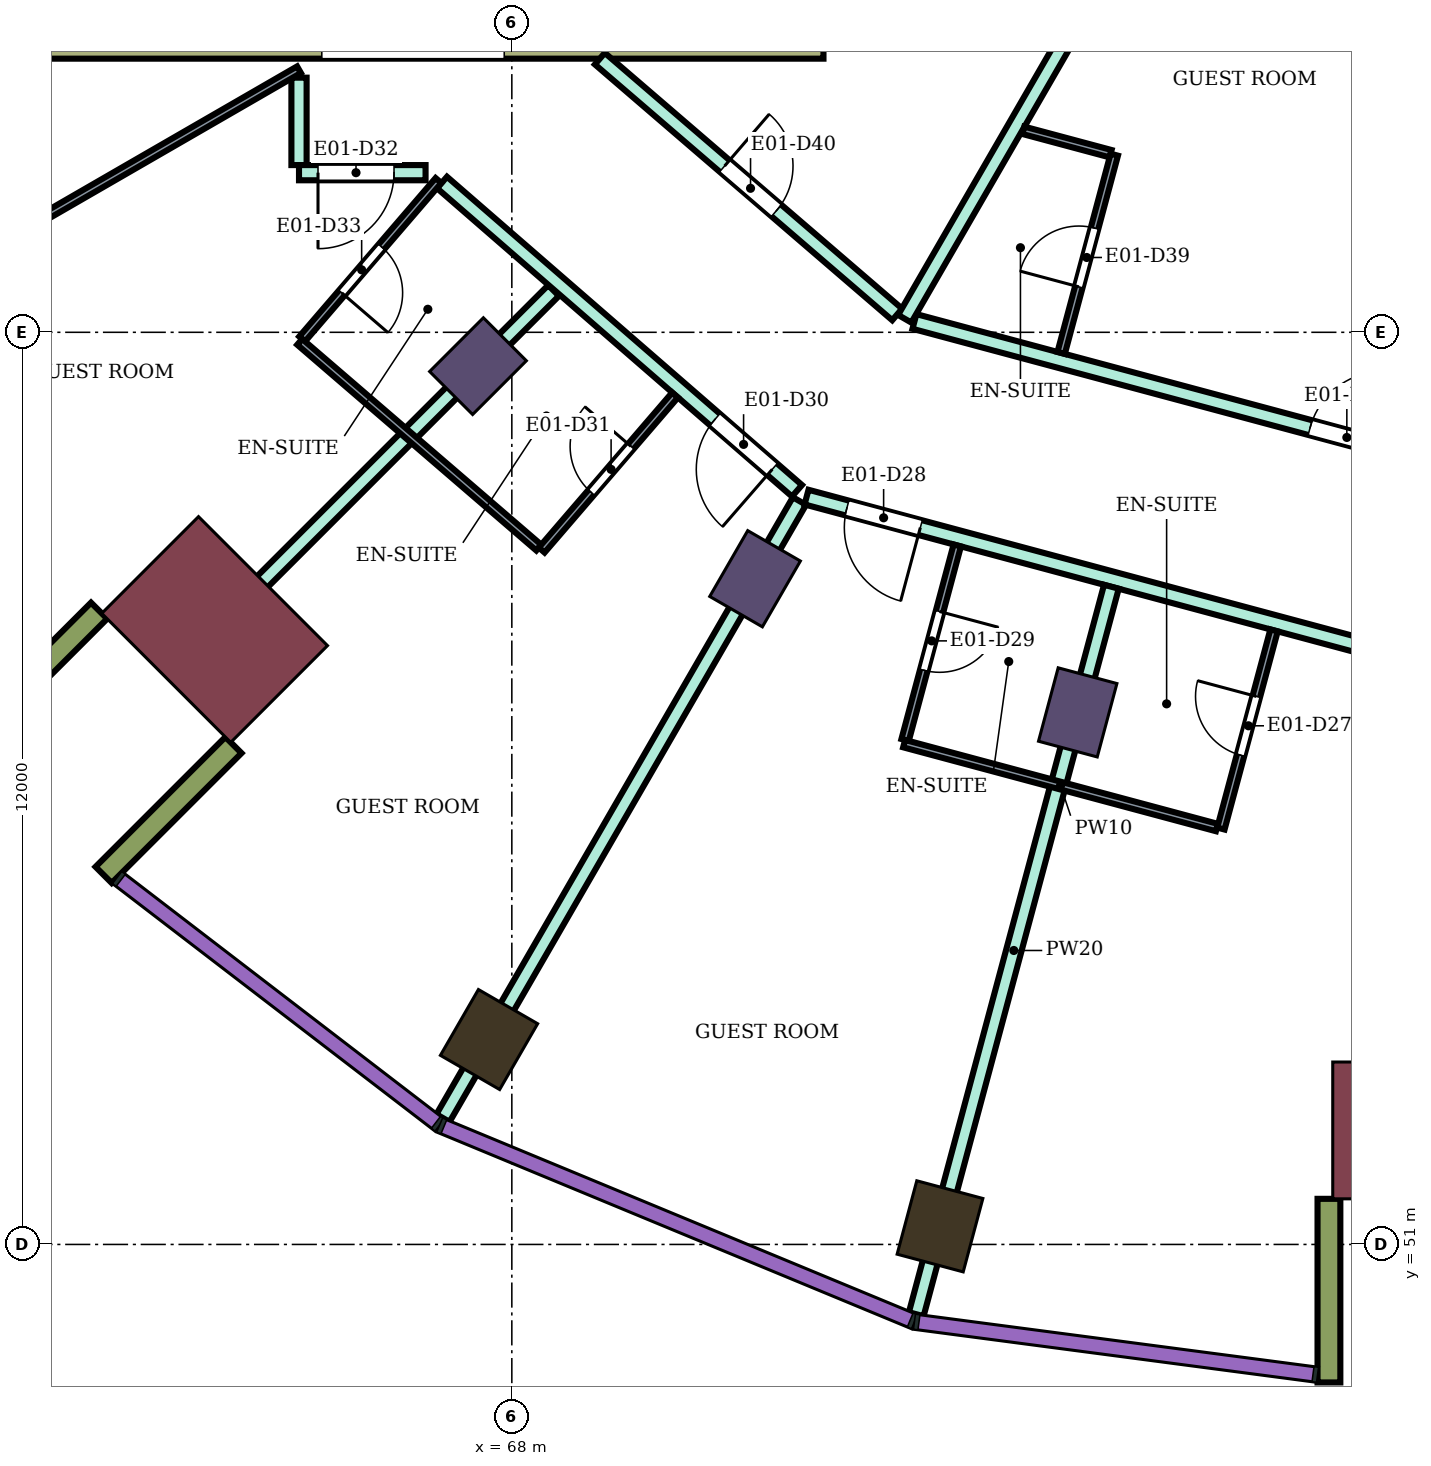
"""IFC4 building model, lengths in metres.
Left out: names, types, materials, properties, quantities, classifications, styles, units other than length and angle.
Written with IfcOpenShell. Run it as: python <this file> out.ifc"""

import sys

from ifc_helpers import new_model, si_unit, direction, frame, frame_2d, origin, origin_2d, place, context, subcontext, project, spatial, rectangle, extrude, element, fill, save


model = new_model("IFC4")
c1 = context("Model", 3, precision=1e-05, world=origin(), true_north=direction((0.0, 1.0)))
c2 = subcontext(c1, "Body", "Model", "MODEL_VIEW")
j1 = project(units=[si_unit("LENGTHUNIT", "METRE"), si_unit("PLANEANGLEUNIT", "RADIAN")], contexts=[c1])
p1 = place(None, origin())
s1 = spatial("IfcSite", under=j1, at=p1, CompositionType="ELEMENT")
p2 = place(p1, origin())
s2 = spatial("IfcBuilding", under=s1, at=p2, CompositionType="ELEMENT")
p3 = place(p2, frame((0.0, 0.0, 114.6)))
s3 = spatial("IfcBuildingStorey", under=s2, at=p3, CompositionType="ELEMENT", Elevation=114.6)
for number, where, z_axis, x_axis in (
    (1, (67.7, 53.696, 0.0), (0.0, 0.0, 1.0), (-0.5, -0.866, 0.0)),
    (2, (73.633, 51.238, 0.0), (0.0, 0.0, 1.0), (-0.259, -0.966, 0.0)),
):
    element("IfcColumn", number, at=place(p3, frame(where, z_axis=z_axis, x_axis=x_axis)), inside=s3, PredefinedType="COLUMN", context=c2, shape_type="SweptSolid", body=[
        extrude(rectangle(XDim=1.0, YDim=0.9, at=origin_2d()), origin(), (0.0, 0.0, 1.0), 3.9),
    ])
for number, where, z_axis, x_axis in (
    (3, (67.555, 62.555, 0.0), (0.0, 0.0, 1.0), (-0.707, -0.707, 0.0)),
    (4, (71.2, 59.758, 0.0), (0.0, 0.0, 1.0), (-0.5, -0.866, 0.0)),
    (5, (75.445, 58.0, 0.0), (0.0, 0.0, 1.0), (-0.259, -0.966, 0.0)),
):
    element("IfcColumn", number, at=place(p3, frame(where, z_axis=z_axis, x_axis=x_axis)), inside=s3, PredefinedType="COLUMN", context=c2, shape_type="SweptSolid", body=[
        extrude(rectangle(XDim=1.0, YDim=0.8, at=origin_2d()), origin(), (0.0, 0.0, 1.0), 3.9),
    ])
for number, where, z_axis, x_axis in (
    (6, (64.09, 59.09, 0.0), (0.0, 0.0, 1.0), (-0.707, -0.707, 0.0)),
    (7, (80.0, 52.5, 0.0), (0.0, 0.0, 1.0), (0.0, -1.0, 0.0)),
):
    element("IfcColumn", number, at=place(p3, frame(where, z_axis=z_axis, x_axis=x_axis)), inside=s3, PredefinedType="COLUMN", context=c2, shape_type="SweptSolid", body=[
        extrude(rectangle(XDim=1.8, YDim=2.4, at=origin_2d()), origin(), (0.0, 0.0, 1.0), 3.9),
    ])
p4 = place(p3, frame((72.1, 66.95, 0.0), z_axis=(0.0, 0.0, 1.0), x_axis=(-1.0, 0.0, 0.0)))
e8 = element("IfcWall", 8, at=p4, inside=s3, PredefinedType="SHEAR", context=c2, shape_type="SweptSolid", body=[
    extrude(rectangle(XDim=14.8, YDim=0.7, at=frame_2d((7.4, 0.0))), origin(), (0.0, 0.0, 1.0), 3.58),
])
p5 = place(p4, frame((4.2, 0.0, 0.0)))
e9 = element("IfcOpeningElement", 9, at=p5, cuts=e8, PredefinedType="OPENING", context=c2, shape_type="SweptSolid", body=[
    extrude(rectangle(XDim=2.4, YDim=2.4, at=frame_2d((1.2, 1.2))), frame((0.0, 0.36, 0.0), z_axis=(0.0, -1.0, 0.0), x_axis=(1.0, 0.0, 0.0)), (0.0, 0.0, 1.0), 0.72),
])
for number, where, z_axis, x_axis in (
    (10, (62.57, 59.338, 0.0), (0.0, 0.0, 1.0), (-0.707, -0.707, 0.0)),
    (11, (64.338, 57.57, 0.0), (0.0, 0.0, 1.0), (-0.707, -0.707, 0.0)),
    (12, (78.75, 51.6, 0.0), (0.0, 0.0, 1.0), (0.0, -1.0, 0.0)),
):
    element("IfcWall", number, at=place(p3, frame(where, z_axis=z_axis, x_axis=x_axis)), inside=s3, PredefinedType="NOTDEFINED", context=c2, shape_type="SweptSolid", body=[
        extrude(rectangle(XDim=2.416, YDim=0.3, at=frame_2d((1.208, 0.0))), origin(), (0.0, 0.0, 1.0), 3.9),
    ])
p6 = place(p3, frame((63.596, 58.596, 0.0), z_axis=(0.0, 0.0, 1.0), x_axis=(0.707106781187, 0.707106781187, 0.0)))
e13 = element("IfcWall", 13, at=p6, inside=s3, PredefinedType="PARTITIONING", context=c2, shape_type="SweptSolid", body=[
    extrude(rectangle(XDim=7.005, YDim=0.2, at=frame_2d((3.503, 0.0))), origin(), (0.0, 0.0, 1.0), 3.45),
])
p7 = place(p3, frame((65.2, 65.2, 0.0), z_axis=(0.0, 0.0, 1.0), x_axis=(0.0, 1.0, 0.0)))
e14 = element("IfcWall", 14, at=p7, inside=s3, PredefinedType="PARTITIONING", context=c2, shape_type="SweptSolid", body=[
    extrude(rectangle(XDim=1.15, YDim=0.2, at=frame_2d((0.575, 0.0))), origin(), (0.0, 0.0, 1.0), 3.45),
])
p8 = place(p3, frame((65.2, 65.1, 0.0), z_axis=(0.0, 0.0, 1.0), x_axis=(1.0, 0.0, 0.0)))
e15 = element("IfcWall", 15, at=p8, inside=s3, PredefinedType="PARTITIONING", context=c2, shape_type="SweptSolid", body=[
    extrude(rectangle(XDim=1.665, YDim=0.2, at=frame_2d((0.833, 0.0))), origin(), (0.0, 0.0, 1.0), 3.45),
])
p9 = place(p8, frame((0.25, 0.0, 0.0)))
e16 = element("IfcOpeningElement", 16, at=p9, cuts=e15, PredefinedType="OPENING", context=c2, shape_type="SweptSolid", body=[
    extrude(rectangle(XDim=1.0, YDim=2.1, at=frame_2d((0.5, 1.05))), frame((0.0, 0.11, 0.0), z_axis=(0.0, -1.0, 0.0), x_axis=(1.0, 0.0, 0.0)), (0.0, 0.0, 1.0), 0.22),
])
p10 = place(p3, frame((67.081, 64.971, 0.0), z_axis=(0.0, 0.0, 1.0), x_axis=(0.755031061605, -0.65568902386, 0.0)))
e17 = element("IfcWall", 17, at=p10, inside=s3, PredefinedType="PARTITIONING", context=c2, shape_type="SweptSolid", body=[
    extrude(rectangle(XDim=6.186, YDim=0.2, at=frame_2d((3.093, 0.0))), origin(), (0.0, 0.0, 1.0), 3.45),
])
p11 = place(p10, frame((4.755, 0.0, 0.0)))
e18 = element("IfcOpeningElement", 18, at=p11, cuts=e17, PredefinedType="OPENING", context=c2, shape_type="SweptSolid", body=[
    extrude(rectangle(XDim=1.0, YDim=2.1, at=frame_2d((0.5, 1.05))), frame((0.0, 0.11, 0.0), z_axis=(0.0, -1.0, 0.0), x_axis=(1.0, 0.0, 0.0)), (0.0, 0.0, 1.0), 0.22),
])
p12 = place(p3, frame((67.094, 52.663, 0.0), z_axis=(0.0, 0.0, 1.0), x_axis=(0.500228134253, 0.865893650342, 0.0)))
e19 = element("IfcWall", 19, at=p12, inside=s3, PredefinedType="PARTITIONING", context=c2, shape_type="SweptSolid", body=[
    extrude(rectangle(XDim=9.375, YDim=0.2, at=frame_2d((4.687, 0.0))), origin(), (0.0, 0.0, 1.0), 3.45),
])
p13 = place(p3, frame((69.158, 66.6, 0.0), z_axis=(0.0, 0.0, 1.0), x_axis=(0.758063092745, -0.652181222835, 0.0)))
e20 = element("IfcWall", 20, at=p13, inside=s3, PredefinedType="PARTITIONING", context=c2, shape_type="SweptSolid", body=[
    extrude(rectangle(XDim=5.16, YDim=0.2, at=frame_2d((2.58, 0.0))), origin(), (0.0, 0.0, 1.0), 3.45),
])
p14 = place(p13, frame((2.165, 0.0, 0.0)))
e21 = element("IfcOpeningElement", 21, at=p14, cuts=e20, PredefinedType="OPENING", context=c2, shape_type="SweptSolid", body=[
    extrude(rectangle(XDim=0.9, YDim=2.1, at=frame_2d((0.45, 1.05))), frame((0.0, 0.11, 0.0), z_axis=(0.0, -1.0, 0.0), x_axis=(1.0, 0.0, 0.0)), (0.0, 0.0, 1.0), 0.22),
])
p15 = place(p3, frame((71.877, 60.832, 0.0), z_axis=(0.0, 0.0, 1.0), x_axis=(0.965857276008, -0.259074742848, 0.0)))
e22 = element("IfcWall", 22, at=p15, inside=s3, PredefinedType="PARTITIONING", context=c2, shape_type="SweptSolid", body=[
    extrude(rectangle(XDim=8.36, YDim=0.2, at=frame_2d((4.18, 0.0))), origin(), (0.0, 0.0, 1.0), 3.45),
])
p16 = place(p15, frame((0.55, 0.0, 0.0)))
e23 = element("IfcOpeningElement", 23, at=p16, cuts=e22, PredefinedType="OPENING", context=c2, shape_type="SweptSolid", body=[
    extrude(rectangle(XDim=1.0, YDim=2.1, at=frame_2d((0.5, 1.05))), frame((0.0, 0.11, 0.0), z_axis=(0.0, -1.0, 0.0), x_axis=(1.0, 0.0, 0.0)), (0.0, 0.0, 1.0), 0.22),
])
p17 = place(p3, frame((73.297, 63.143, 0.0), z_axis=(0.0, 0.0, 1.0), x_axis=(0.965859030528, -0.25906820173, 0.0)))
e24 = element("IfcWall", 24, at=p17, inside=s3, PredefinedType="PARTITIONING", context=c2, shape_type="SweptSolid", body=[
    extrude(rectangle(XDim=6.81, YDim=0.2, at=frame_2d((3.405, 0.0))), origin(), (0.0, 0.0, 1.0), 3.45),
])
p18 = place(p17, frame((5.39, 0.0, 0.0)))
e25 = element("IfcOpeningElement", 25, at=p18, cuts=e24, PredefinedType="OPENING", context=c2, shape_type="SweptSolid", body=[
    extrude(rectangle(XDim=1.0, YDim=2.1, at=frame_2d((0.5, 1.05))), frame((0.0, 0.11, 0.0), z_axis=(0.0, -1.0, 0.0), x_axis=(1.0, 0.0, 0.0)), (0.0, 0.0, 1.0), 0.22),
])
p19 = place(p3, frame((73.169, 63.178, 0.0), z_axis=(0.0, 0.0, 1.0), x_axis=(0.500239348149, 0.865887171959, 0.0)))
e26 = element("IfcWall", 26, at=p19, inside=s3, PredefinedType="PARTITIONING", context=c2, shape_type="SweptSolid", body=[
    extrude(rectangle(XDim=5.955, YDim=0.2, at=frame_2d((2.978, 0.0))), origin(), (0.0, 0.0, 1.0), 3.45),
])
p20 = place(p3, frame((73.321, 50.082, 0.0), z_axis=(0.0, 0.0, 1.0), x_axis=(0.259057928998, 0.96586178588, 0.0)))
e27 = element("IfcWall", 27, at=p20, inside=s3, PredefinedType="PARTITIONING", context=c2, shape_type="SweptSolid", body=[
    extrude(rectangle(XDim=9.909, YDim=0.2, at=frame_2d((4.954, 0.0))), origin(), (0.0, 0.0, 1.0), 3.45),
])
p21 = place(p3, frame((57.659, 62.101, 0.0), z_axis=(0.0, 0.0, 1.0), x_axis=(0.86602264145, 0.500004784474, 0.0)))
e28 = element("IfcWall", 28, at=p21, inside=s3, PredefinedType="PARTITIONING", context=c2, shape_type="SweptSolid", body=[
    extrude(rectangle(XDim=8.708, YDim=0.1, at=frame_2d((4.354, 0.0))), origin(), (0.0, 0.0, 1.0), 3.45),
])
p22 = place(p21, frame((3.929, 0.0, 0.0)))
e29 = element("IfcOpeningElement", 29, at=p22, cuts=e28, PredefinedType="OPENING", context=c2, shape_type="SweptSolid", body=[
    extrude(rectangle(XDim=0.9, YDim=2.1, at=frame_2d((0.45, 1.05))), frame((0.0, 0.06, 0.0), z_axis=(0.0, -1.0, 0.0), x_axis=(1.0, 0.0, 0.0)), (0.0, 0.0, 1.0), 0.12),
])
p23 = place(p3, frame((65.242, 62.912, 0.0), z_axis=(0.0, 0.0, 1.0), x_axis=(0.652069888227, 0.758158862553, 0.0)))
e30 = element("IfcWall", 30, at=p23, inside=s3, PredefinedType="PARTITIONING", context=c2, shape_type="SweptSolid", body=[
    extrude(rectangle(XDim=2.75, YDim=0.1, at=frame_2d((1.375, 0.0))), origin(), (0.0, 0.0, 1.0), 3.45),
])
p24 = place(p23, frame((0.8, 0.0, 0.0)))
e31 = element("IfcOpeningElement", 31, at=p24, cuts=e30, PredefinedType="OPENING", context=c2, shape_type="SweptSolid", body=[
    extrude(rectangle(XDim=0.8, YDim=2.1, at=frame_2d((0.4, 1.05))), frame((0.0, 0.06, 0.0), z_axis=(0.0, -1.0, 0.0), x_axis=(1.0, 0.0, 0.0)), (0.0, 0.0, 1.0), 0.12),
])
p25 = place(p3, frame((65.209, 62.875, 0.0), z_axis=(0.0, 0.0, 1.0), x_axis=(0.757930378138, -0.652335451969, 0.0)))
e32 = element("IfcWall", 32, at=p25, inside=s3, PredefinedType="PARTITIONING", context=c2, shape_type="SweptSolid", body=[
    extrude(rectangle(XDim=4.15, YDim=0.1, at=frame_2d((2.075, 0.0))), origin(), (0.0, 0.0, 1.0), 3.45),
])
p26 = place(p3, frame((68.393, 60.135, 0.0), z_axis=(0.0, 0.0, 1.0), x_axis=(0.652061182569, 0.758166349944, 0.0)))
e33 = element("IfcWall", 33, at=p26, inside=s3, PredefinedType="PARTITIONING", context=c2, shape_type="SweptSolid", body=[
    extrude(rectangle(XDim=2.69, YDim=0.1, at=frame_2d((1.345, 0.0))), origin(), (0.0, 0.0, 1.0), 3.45),
])
p27 = place(p26, frame((1.0, 0.0, 0.0)))
e34 = element("IfcOpeningElement", 34, at=p27, cuts=e33, PredefinedType="OPENING", context=c2, shape_type="SweptSolid", body=[
    extrude(rectangle(XDim=0.8, YDim=2.1, at=frame_2d((0.4, 1.05))), frame((0.0, 0.06, 0.0), z_axis=(0.0, -1.0, 0.0), x_axis=(1.0, 0.0, 0.0)), (0.0, 0.0, 1.0), 0.12),
])
p28 = place(p3, frame((73.174, 57.636, 0.0), z_axis=(0.0, 0.0, 1.0), x_axis=(0.258952498977, 0.96589005755, 0.0)))
e35 = element("IfcWall", 35, at=p28, inside=s3, PredefinedType="PARTITIONING", context=c2, shape_type="SweptSolid", body=[
    extrude(rectangle(XDim=2.65, YDim=0.1, at=frame_2d((1.325, 0.0))), origin(), (0.0, 0.0, 1.0), 3.45),
])
p29 = place(p28, frame((0.95, 0.0, 0.0)))
e36 = element("IfcOpeningElement", 36, at=p29, cuts=e35, PredefinedType="OPENING", context=c2, shape_type="SweptSolid", body=[
    extrude(rectangle(XDim=0.8, YDim=2.1, at=frame_2d((0.4, 1.05))), frame((0.0, 0.06, 0.0), z_axis=(0.0, -1.0, 0.0), x_axis=(1.0, 0.0, 0.0)), (0.0, 0.0, 1.0), 0.12),
])
p30 = place(p3, frame((73.161, 57.588, 0.0), z_axis=(0.0, 0.0, 1.0), x_axis=(0.965858226827, -0.259071198071, 0.0)))
e37 = element("IfcWall", 37, at=p30, inside=s3, PredefinedType="PARTITIONING", context=c2, shape_type="SweptSolid", body=[
    extrude(rectangle(XDim=4.26, YDim=0.1, at=frame_2d((2.13, 0.0))), origin(), (0.0, 0.0, 1.0), 3.45),
])
p31 = place(p3, frame((74.729, 65.657, 0.0), z_axis=(0.0, 0.0, 1.0), x_axis=(0.965948051503, -0.258736085224, 0.0)))
e38 = element("IfcWall", 38, at=p31, inside=s3, PredefinedType="PARTITIONING", context=c2, shape_type="SweptSolid", body=[
    extrude(rectangle(XDim=1.189, YDim=0.1, at=frame_2d((0.594, 0.0))), origin(), (0.0, 0.0, 1.0), 3.45),
])
p32 = place(p3, frame((75.227, 62.729, 0.0), z_axis=(0.0, 0.0, 1.0), x_axis=(0.258945475746, 0.965891940432, 0.0)))
e39 = element("IfcWall", 39, at=p32, inside=s3, PredefinedType="PARTITIONING", context=c2, shape_type="SweptSolid", body=[
    extrude(rectangle(XDim=2.7, YDim=0.1, at=frame_2d((1.35, 0.0))), origin(), (0.0, 0.0, 1.0), 3.45),
])
p33 = place(p32, frame((0.9, 0.0, 0.0)))
e40 = element("IfcOpeningElement", 40, at=p33, cuts=e39, PredefinedType="OPENING", context=c2, shape_type="SweptSolid", body=[
    extrude(rectangle(XDim=0.8, YDim=2.1, at=frame_2d((0.4, 1.05))), frame((0.0, 0.06, 0.0), z_axis=(0.0, -1.0, 0.0), x_axis=(1.0, 0.0, 0.0)), (0.0, 0.0, 1.0), 0.12),
])
p34 = place(p3, frame((77.329, 56.471, 0.0), z_axis=(0.0, 0.0, 1.0), x_axis=(0.259013334072, 0.965873745773, 0.0)))
e41 = element("IfcWall", 41, at=p34, inside=s3, PredefinedType="PARTITIONING", context=c2, shape_type="SweptSolid", body=[
    extrude(rectangle(XDim=2.699, YDim=0.1, at=frame_2d((1.35, 0.0))), origin(), (0.0, 0.0, 1.0), 3.45),
])
p35 = place(p34, frame((1.0, 0.0, 0.0)))
e42 = element("IfcOpeningElement", 42, at=p35, cuts=e41, PredefinedType="OPENING", context=c2, shape_type="SweptSolid", body=[
    extrude(rectangle(XDim=0.8, YDim=2.1, at=frame_2d((0.4, 1.05))), frame((0.0, 0.06, 0.0), z_axis=(0.0, -1.0, 0.0), x_axis=(1.0, 0.0, 0.0)), (0.0, 0.0, 1.0), 0.12),
])
p36 = place(p35, origin())
e43 = element("IfcDoor", 43, at=p36, inside=s3, OperationType="SINGLE_SWING_RIGHT", PredefinedType="DOOR", context=c2, shape_type="SweptSolid", body=[
    extrude(rectangle(XDim=0.8, YDim=2.1, at=frame_2d((0.4, 1.05))), frame((0.0, 0.025, 0.0), z_axis=(0.0, -1.0, 0.0), x_axis=(1.0, 0.0, 0.0)), (0.0, 0.0, 1.0), 0.05),
])
fill(e42, e43)
p37 = place(p16, frame((1.0, 0.0, 0.0), z_axis=(0.0, 0.0, 1.0), x_axis=(-1.0, 0.0, 0.0)))
e44 = element("IfcDoor", 44, at=p37, inside=s3, OperationType="SINGLE_SWING_LEFT", PredefinedType="DOOR", context=c2, shape_type="SweptSolid", body=[
    extrude(rectangle(XDim=1.0, YDim=2.1, at=frame_2d((0.5, 1.05))), frame((0.0, 0.025, 0.0), z_axis=(0.0, -1.0, 0.0), x_axis=(1.0, 0.0, 0.0)), (0.0, 0.0, 1.0), 0.05),
])
fill(e23, e44)
p38 = place(p29, frame((0.8, 0.0, 0.0), z_axis=(0.0, 0.0, 1.0), x_axis=(-1.0, 0.0, 0.0)))
e45 = element("IfcDoor", 45, at=p38, inside=s3, OperationType="SINGLE_SWING_LEFT", PredefinedType="DOOR", context=c2, shape_type="SweptSolid", body=[
    extrude(rectangle(XDim=0.8, YDim=2.1, at=frame_2d((0.4, 1.05))), frame((0.0, 0.025, 0.0), z_axis=(0.0, -1.0, 0.0), x_axis=(1.0, 0.0, 0.0)), (0.0, 0.0, 1.0), 0.05),
])
fill(e36, e45)
p39 = place(p11, frame((1.0, 0.0, 0.0), z_axis=(0.0, 0.0, 1.0), x_axis=(-1.0, 0.0, 0.0)))
e46 = element("IfcDoor", 46, at=p39, inside=s3, OperationType="SINGLE_SWING_LEFT", PredefinedType="DOOR", context=c2, shape_type="SweptSolid", body=[
    extrude(rectangle(XDim=1.0, YDim=2.1, at=frame_2d((0.5, 1.05))), frame((0.0, 0.025, 0.0), z_axis=(0.0, -1.0, 0.0), x_axis=(1.0, 0.0, 0.0)), (0.0, 0.0, 1.0), 0.05),
])
fill(e18, e46)
p40 = place(p27, origin())
e47 = element("IfcDoor", 47, at=p40, inside=s3, OperationType="SINGLE_SWING_RIGHT", PredefinedType="DOOR", context=c2, shape_type="SweptSolid", body=[
    extrude(rectangle(XDim=0.8, YDim=2.1, at=frame_2d((0.4, 1.05))), frame((0.0, 0.025, 0.0), z_axis=(0.0, -1.0, 0.0), x_axis=(1.0, 0.0, 0.0)), (0.0, 0.0, 1.0), 0.05),
])
fill(e34, e47)
p41 = place(p9, frame((1.0, 0.0, 0.0), z_axis=(0.0, 0.0, 1.0), x_axis=(-1.0, 0.0, 0.0)))
e48 = element("IfcDoor", 48, at=p41, inside=s3, OperationType="SINGLE_SWING_RIGHT", PredefinedType="DOOR", context=c2, shape_type="SweptSolid", body=[
    extrude(rectangle(XDim=1.0, YDim=2.1, at=frame_2d((0.5, 1.05))), frame((0.0, 0.025, 0.0), z_axis=(0.0, -1.0, 0.0), x_axis=(1.0, 0.0, 0.0)), (0.0, 0.0, 1.0), 0.05),
])
fill(e16, e48)
p42 = place(p24, frame((0.8, 0.0, 0.0), z_axis=(0.0, 0.0, 1.0), x_axis=(-1.0, 0.0, 0.0)))
e49 = element("IfcDoor", 49, at=p42, inside=s3, OperationType="SINGLE_SWING_RIGHT", PredefinedType="DOOR", context=c2, shape_type="SweptSolid", body=[
    extrude(rectangle(XDim=0.8, YDim=2.1, at=frame_2d((0.4, 1.05))), frame((0.0, 0.025, 0.0), z_axis=(0.0, -1.0, 0.0), x_axis=(1.0, 0.0, 0.0)), (0.0, 0.0, 1.0), 0.05),
])
fill(e31, e49)
p43 = place(p18, origin())
e50 = element("IfcDoor", 50, at=p43, inside=s3, OperationType="SINGLE_SWING_RIGHT", PredefinedType="DOOR", context=c2, shape_type="SweptSolid", body=[
    extrude(rectangle(XDim=1.0, YDim=2.1, at=frame_2d((0.5, 1.05))), frame((0.0, 0.025, 0.0), z_axis=(0.0, -1.0, 0.0), x_axis=(1.0, 0.0, 0.0)), (0.0, 0.0, 1.0), 0.05),
])
fill(e25, e50)
p44 = place(p33, origin())
e51 = element("IfcDoor", 51, at=p44, inside=s3, OperationType="SINGLE_SWING_LEFT", PredefinedType="DOOR", context=c2, shape_type="SweptSolid", body=[
    extrude(rectangle(XDim=0.8, YDim=2.1, at=frame_2d((0.4, 1.05))), frame((0.0, 0.025, 0.0), z_axis=(0.0, -1.0, 0.0), x_axis=(1.0, 0.0, 0.0)), (0.0, 0.0, 1.0), 0.05),
])
fill(e40, e51)
p45 = place(p14, origin())
e52 = element("IfcDoor", 52, at=p45, inside=s3, OperationType="SINGLE_SWING_LEFT", PredefinedType="DOOR", context=c2, shape_type="SweptSolid", body=[
    extrude(rectangle(XDim=0.9, YDim=2.1, at=frame_2d((0.45, 1.05))), frame((0.0, 0.025, 0.0), z_axis=(0.0, -1.0, 0.0), x_axis=(1.0, 0.0, 0.0)), (0.0, 0.0, 1.0), 0.05),
])
fill(e21, e52)
save(model, sys.argv[1])
